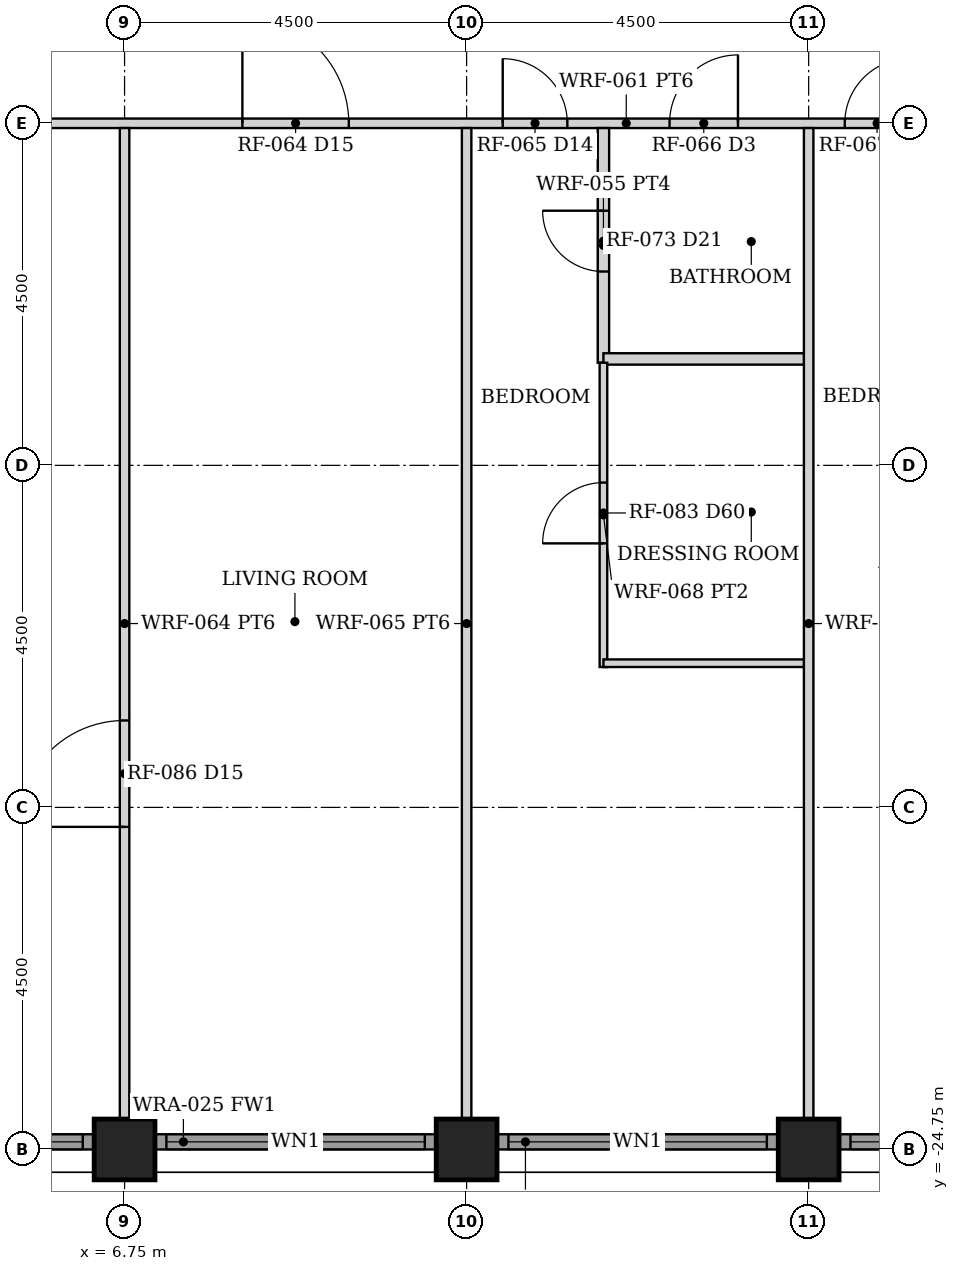
"""IFC4 building model, lengths in metres.
Left out: names, types, materials, properties, quantities, classifications, styles, units other than length and angle.
Written with IfcOpenShell. Run it as: python <this file> out.ifc"""

import sys

from ifc_helpers import new_model, si_unit, direction, frame, frame_2d, origin, origin_2d, place, context, subcontext, project, spatial, rectangle, hollow_rectangle, extrude, element, fill, save


model = new_model("IFC4")
c1 = context("Model", 3, precision=1e-05, world=origin(), true_north=direction((0.0, 1.0)))
c2 = subcontext(c1, "Body", "Model", "MODEL_VIEW")
j1 = project(units=[si_unit("LENGTHUNIT", "METRE"), si_unit("PLANEANGLEUNIT", "RADIAN")], contexts=[c1])
p1 = place(None, origin())
s1 = spatial("IfcSite", under=j1, at=p1, CompositionType="ELEMENT")
p2 = place(p1, origin())
s2 = spatial("IfcBuilding", under=s1, at=p2, CompositionType="ELEMENT")
p3 = place(p2, frame((0.0, 0.0, 79.0)))
s3 = spatial("IfcBuildingStorey", under=s2, at=p3, CompositionType="ELEMENT", Elevation=79.0)
for number, where, z_axis, x_axis in (
    (1, (6.75, -24.75, 0.0), (0.0, 0.0, 1.0), (0.0, 1.0, 0.0)),
    (2, (11.25, -24.75, 0.0), (0.0, 0.0, 1.0), (0.0, 1.0, 0.0)),
    (3, (15.75, -24.75, 0.0), (0.0, 0.0, 1.0), (0.0, 1.0, 0.0)),
):
    element("IfcColumn", number, at=place(p3, frame(where, z_axis=z_axis, x_axis=x_axis)), inside=s3, PredefinedType="COLUMN", context=c2, shape_type="SweptSolid", body=[
        extrude(hollow_rectangle(XDim=0.8, YDim=0.8, WallThickness=0.06, at=origin_2d()), origin(), (0.0, 0.0, 1.0), 3.5),
    ])
p4 = place(p3, frame((2.655, -24.65, 0.0), z_axis=(0.0, 0.0, 1.0), x_axis=(1.0, 0.0, 0.0)))
e4 = element("IfcWall", 4, at=p4, inside=s3, PredefinedType="SOLIDWALL", context=c2, shape_type="SweptSolid", body=[
    extrude(rectangle(XDim=3.69, YDim=0.2, at=frame_2d((1.845, 0.0))), origin(), (0.0, 0.0, 1.0), 2.379),
])
p5 = place(p4, frame((0.145, 0.0, 0.3)))
e5 = element("IfcOpeningElement", 5, at=p5, cuts=e4, PredefinedType="OPENING", context=c2, shape_type="SweptSolid", body=[
    extrude(rectangle(XDim=3.4, YDim=1.929, at=frame_2d((1.7, 0.964))), frame((0.0, 0.11, 0.0), z_axis=(0.0, -1.0, 0.0), x_axis=(1.0, 0.0, 0.0)), (0.0, 0.0, 1.0), 0.22),
])
p6 = place(p3, frame((7.155, -24.65, 0.0), z_axis=(0.0, 0.0, 1.0), x_axis=(1.0, 0.0, 0.0)))
e6 = element("IfcWall", 6, at=p6, inside=s3, PredefinedType="SOLIDWALL", context=c2, shape_type="SweptSolid", body=[
    extrude(rectangle(XDim=3.69, YDim=0.2, at=frame_2d((1.845, 0.0))), origin(), (0.0, 0.0, 1.0), 2.379),
])
p7 = place(p6, frame((0.145, 0.0, 0.3)))
e7 = element("IfcOpeningElement", 7, at=p7, cuts=e6, PredefinedType="OPENING", context=c2, shape_type="SweptSolid", body=[
    extrude(rectangle(XDim=3.4, YDim=1.929, at=frame_2d((1.7, 0.964))), frame((0.0, 0.11, 0.0), z_axis=(0.0, -1.0, 0.0), x_axis=(1.0, 0.0, 0.0)), (0.0, 0.0, 1.0), 0.22),
])
p8 = place(p3, frame((11.655, -24.65, 0.0), z_axis=(0.0, 0.0, 1.0), x_axis=(1.0, 0.0, 0.0)))
e8 = element("IfcWall", 8, at=p8, inside=s3, PredefinedType="SOLIDWALL", context=c2, shape_type="SweptSolid", body=[
    extrude(rectangle(XDim=3.69, YDim=0.2, at=frame_2d((1.845, 0.0))), origin(), (0.0, 0.0, 1.0), 2.379),
])
p9 = place(p8, frame((0.145, 0.0, 0.3)))
e9 = element("IfcOpeningElement", 9, at=p9, cuts=e8, PredefinedType="OPENING", context=c2, shape_type="SweptSolid", body=[
    extrude(rectangle(XDim=3.4, YDim=1.929, at=frame_2d((1.7, 0.964))), frame((0.0, 0.11, 0.0), z_axis=(0.0, -1.0, 0.0), x_axis=(1.0, 0.0, 0.0)), (0.0, 0.0, 1.0), 0.22),
])
p10 = place(p3, frame((16.155, -24.65, 0.0), z_axis=(0.0, 0.0, 1.0), x_axis=(1.0, 0.0, 0.0)))
e10 = element("IfcWall", 10, at=p10, inside=s3, PredefinedType="SOLIDWALL", context=c2, shape_type="SweptSolid", body=[
    extrude(rectangle(XDim=3.69, YDim=0.2, at=frame_2d((1.845, 0.0))), origin(), (0.0, 0.0, 1.0), 2.379),
])
p11 = place(p10, frame((0.145, 0.0, 0.3)))
e11 = element("IfcOpeningElement", 11, at=p11, cuts=e10, PredefinedType="OPENING", context=c2, shape_type="SweptSolid", body=[
    extrude(rectangle(XDim=3.4, YDim=1.929, at=frame_2d((1.7, 0.964))), frame((0.0, 0.11, 0.0), z_axis=(0.0, -1.0, 0.0), x_axis=(1.0, 0.0, 0.0)), (0.0, 0.0, 1.0), 0.22),
])
p12 = place(p3, frame((2.35, -11.25, 0.0), z_axis=(0.0, 0.0, 1.0), x_axis=(1.0, 0.0, 0.0)))
e12 = element("IfcWall", 12, at=p12, inside=s3, PredefinedType="PARTITIONING", context=c2, shape_type="SweptSolid", body=[
    extrude(rectangle(XDim=22.0, YDim=0.125, at=frame_2d((11.0, 0.0))), origin(), (0.0, 0.0, 1.0), 2.373),
])
p13 = place(p12, frame((0.85, 0.0, 0.0)))
e13 = element("IfcOpeningElement", 13, at=p13, cuts=e12, PredefinedType="OPENING", context=c2, shape_type="SweptSolid", body=[
    extrude(rectangle(XDim=0.9, YDim=2.1, at=frame_2d((0.45, 1.05))), frame((0.0, 0.073, 0.0), z_axis=(0.0, -1.0, 0.0), x_axis=(1.0, 0.0, 0.0)), (0.0, 0.0, 1.0), 0.145),
])
p14 = place(p12, frame((5.95, 0.0, 0.0)))
e14 = element("IfcOpeningElement", 14, at=p14, cuts=e12, PredefinedType="OPENING", context=c2, shape_type="SweptSolid", body=[
    extrude(rectangle(XDim=1.4, YDim=2.1, at=frame_2d((0.7, 1.05))), frame((0.0, 0.073, 0.0), z_axis=(0.0, -1.0, 0.0), x_axis=(1.0, 0.0, 0.0)), (0.0, 0.0, 1.0), 0.145),
])
p15 = place(p12, frame((9.375, 0.0, 0.0)))
e15 = element("IfcOpeningElement", 15, at=p15, cuts=e12, PredefinedType="OPENING", context=c2, shape_type="SweptSolid", body=[
    extrude(rectangle(XDim=0.85, YDim=2.1, at=frame_2d((0.425, 1.05))), frame((0.0, 0.073, 0.0), z_axis=(0.0, -1.0, 0.0), x_axis=(1.0, 0.0, 0.0)), (0.0, 0.0, 1.0), 0.145),
])
p16 = place(p12, frame((11.57, 0.0, 0.0)))
e16 = element("IfcOpeningElement", 16, at=p16, cuts=e12, PredefinedType="OPENING", context=c2, shape_type="SweptSolid", body=[
    extrude(rectangle(XDim=0.9, YDim=2.1, at=frame_2d((0.45, 1.05))), frame((0.0, 0.073, 0.0), z_axis=(0.0, -1.0, 0.0), x_axis=(1.0, 0.0, 0.0)), (0.0, 0.0, 1.0), 0.145),
])
p17 = place(p12, frame((13.875, 0.0, 0.0)))
e17 = element("IfcOpeningElement", 17, at=p17, cuts=e12, PredefinedType="OPENING", context=c2, shape_type="SweptSolid", body=[
    extrude(rectangle(XDim=0.85, YDim=2.1, at=frame_2d((0.425, 1.05))), frame((0.0, 0.073, 0.0), z_axis=(0.0, -1.0, 0.0), x_axis=(1.0, 0.0, 0.0)), (0.0, 0.0, 1.0), 0.145),
])
p18 = place(p12, frame((18.375, 0.0, 0.0)))
e18 = element("IfcOpeningElement", 18, at=p18, cuts=e12, PredefinedType="OPENING", context=c2, shape_type="SweptSolid", body=[
    extrude(rectangle(XDim=0.85, YDim=2.1, at=frame_2d((0.425, 1.05))), frame((0.0, 0.073, 0.0), z_axis=(0.0, -1.0, 0.0), x_axis=(1.0, 0.0, 0.0)), (0.0, 0.0, 1.0), 0.145),
])
p19 = place(p3, frame((6.75, -24.35, 0.0), z_axis=(0.0, 0.0, 1.0), x_axis=(0.0, 1.0, 0.0)))
e19 = element("IfcWall", 19, at=p19, inside=s3, PredefinedType="PARTITIONING", context=c2, shape_type="SweptSolid", body=[
    extrude(rectangle(XDim=13.038, YDim=0.125, at=frame_2d((6.519, 0.0))), origin(), (0.0, 0.0, 1.0), 2.373),
])
p20 = place(p19, frame((3.844, 0.0, 0.0)))
e20 = element("IfcOpeningElement", 20, at=p20, cuts=e19, PredefinedType="OPENING", context=c2, shape_type="SweptSolid", body=[
    extrude(rectangle(XDim=1.4, YDim=2.1, at=frame_2d((0.7, 1.05))), frame((0.0, 0.073, 0.0), z_axis=(0.0, -1.0, 0.0), x_axis=(1.0, 0.0, 0.0)), (0.0, 0.0, 1.0), 0.145),
])
p21 = place(p3, frame((11.25, -24.35, 0.0), z_axis=(0.0, 0.0, 1.0), x_axis=(0.0, 1.0, 0.0)))
e21 = element("IfcWall", 21, at=p21, inside=s3, PredefinedType="PARTITIONING", context=c2, shape_type="SweptSolid", body=[
    extrude(rectangle(XDim=13.038, YDim=0.125, at=frame_2d((6.519, 0.0))), origin(), (0.0, 0.0, 1.0), 2.373),
])
p22 = place(p3, frame((13.05, -14.4, 0.0), z_axis=(0.0, 0.0, 1.0), x_axis=(0.0, 1.0, 0.0)))
e22 = element("IfcWall", 22, at=p22, inside=s3, PredefinedType="PARTITIONING", context=c2, shape_type="SweptSolid", body=[
    extrude(rectangle(XDim=3.087, YDim=0.15, at=frame_2d((1.544, 0.0))), origin(), (0.0, 0.0, 1.0), 2.373),
])
p23 = place(p22, frame((1.2, 0.0, 0.0)))
e23 = element("IfcOpeningElement", 23, at=p23, cuts=e22, PredefinedType="OPENING", context=c2, shape_type="SweptSolid", body=[
    extrude(rectangle(XDim=0.8, YDim=2.1, at=frame_2d((0.4, 1.05))), frame((0.0, 0.085, 0.0), z_axis=(0.0, -1.0, 0.0), x_axis=(1.0, 0.0, 0.0)), (0.0, 0.0, 1.0), 0.17),
])
p24 = place(p3, frame((13.05, -14.35, 0.0), z_axis=(0.0, 0.0, 1.0), x_axis=(1.0, 0.0, 0.0)))
e24 = element("IfcWall", 24, at=p24, inside=s3, PredefinedType="PARTITIONING", context=c2, shape_type="SweptSolid", body=[
    extrude(rectangle(XDim=2.64, YDim=0.15, at=frame_2d((1.32, 0.0))), origin(), (0.0, 0.0, 1.0), 2.373),
])
p25 = place(p3, frame((13.05, -18.403, 0.0), z_axis=(0.0, 0.0, 1.0), x_axis=(0.0, 1.0, 0.0)))
e25 = element("IfcWall", 25, at=p25, inside=s3, PredefinedType="PARTITIONING", context=c2, shape_type="SweptSolid", body=[
    extrude(rectangle(XDim=4.003, YDim=0.1, at=frame_2d((2.001, 0.0))), origin(), (0.0, 0.0, 1.0), 2.373),
])
p26 = place(p25, frame((1.627, 0.0, 0.0)))
e26 = element("IfcOpeningElement", 26, at=p26, cuts=e25, PredefinedType="OPENING", context=c2, shape_type="SweptSolid", body=[
    extrude(rectangle(XDim=0.8, YDim=2.1, at=frame_2d((0.4, 1.05))), frame((0.0, 0.06, 0.0), z_axis=(0.0, -1.0, 0.0), x_axis=(1.0, 0.0, 0.0)), (0.0, 0.0, 1.0), 0.12),
])
p27 = place(p3, frame((13.05, -18.353, 0.0), z_axis=(0.0, 0.0, 1.0), x_axis=(1.0, 0.0, 0.0)))
e27 = element("IfcWall", 27, at=p27, inside=s3, PredefinedType="PARTITIONING", context=c2, shape_type="SweptSolid", body=[
    extrude(rectangle(XDim=2.64, YDim=0.1, at=frame_2d((1.32, 0.0))), origin(), (0.0, 0.0, 1.0), 2.373),
])
p28 = place(p3, frame((15.75, -24.35, 0.0), z_axis=(0.0, 0.0, 1.0), x_axis=(0.0, 1.0, 0.0)))
e28 = element("IfcWall", 28, at=p28, inside=s3, PredefinedType="PARTITIONING", context=c2, shape_type="SweptSolid", body=[
    extrude(rectangle(XDim=13.038, YDim=0.125, at=frame_2d((6.519, 0.0))), origin(), (0.0, 0.0, 1.0), 2.373),
])
p29 = place(p5, origin())
e29 = element("IfcWindow", 29, at=p29, inside=s3, PartitioningType="SINGLE_PANEL", PredefinedType="WINDOW", context=c2, shape_type="SweptSolid", body=[
    extrude(rectangle(XDim=3.4, YDim=1.929, at=frame_2d((1.7, 0.964))), frame((0.0, 0.03, 0.0), z_axis=(0.0, -1.0, 0.0), x_axis=(1.0, 0.0, 0.0)), (0.0, 0.0, 1.0), 0.06),
])
fill(e5, e29)
p30 = place(p7, origin())
e30 = element("IfcWindow", 30, at=p30, inside=s3, PartitioningType="SINGLE_PANEL", PredefinedType="WINDOW", context=c2, shape_type="SweptSolid", body=[
    extrude(rectangle(XDim=3.4, YDim=1.929, at=frame_2d((1.7, 0.964))), frame((0.0, 0.03, 0.0), z_axis=(0.0, -1.0, 0.0), x_axis=(1.0, 0.0, 0.0)), (0.0, 0.0, 1.0), 0.06),
])
fill(e7, e30)
p31 = place(p9, origin())
e31 = element("IfcWindow", 31, at=p31, inside=s3, PartitioningType="SINGLE_PANEL", PredefinedType="WINDOW", context=c2, shape_type="SweptSolid", body=[
    extrude(rectangle(XDim=3.4, YDim=1.929, at=frame_2d((1.7, 0.964))), frame((0.0, 0.03, 0.0), z_axis=(0.0, -1.0, 0.0), x_axis=(1.0, 0.0, 0.0)), (0.0, 0.0, 1.0), 0.06),
])
fill(e9, e31)
p32 = place(p11, origin())
e32 = element("IfcWindow", 32, at=p32, inside=s3, PartitioningType="SINGLE_PANEL", PredefinedType="WINDOW", context=c2, shape_type="SweptSolid", body=[
    extrude(rectangle(XDim=3.4, YDim=1.929, at=frame_2d((1.7, 0.964))), frame((0.0, 0.03, 0.0), z_axis=(0.0, -1.0, 0.0), x_axis=(1.0, 0.0, 0.0)), (0.0, 0.0, 1.0), 0.06),
])
fill(e11, e32)
p33 = place(p14, origin())
e33 = element("IfcDoor", 33, at=p33, inside=s3, OperationType="SINGLE_SWING_LEFT", PredefinedType="DOOR", context=c2, shape_type="SweptSolid", body=[
    extrude(rectangle(XDim=1.4, YDim=2.1, at=frame_2d((0.7, 1.05))), frame((0.0, 0.025, 0.0), z_axis=(0.0, -1.0, 0.0), x_axis=(1.0, 0.0, 0.0)), (0.0, 0.0, 1.0), 0.05),
])
fill(e14, e33)
p34 = place(p20, origin())
e34 = element("IfcDoor", 34, at=p34, inside=s3, OperationType="SINGLE_SWING_LEFT", PredefinedType="DOOR", context=c2, shape_type="SweptSolid", body=[
    extrude(rectangle(XDim=1.4, YDim=2.1, at=frame_2d((0.7, 1.05))), frame((0.0, 0.025, 0.0), z_axis=(0.0, -1.0, 0.0), x_axis=(1.0, 0.0, 0.0)), (0.0, 0.0, 1.0), 0.05),
])
fill(e20, e34)
p35 = place(p15, origin())
e35 = element("IfcDoor", 35, at=p35, inside=s3, OperationType="SINGLE_SWING_LEFT", PredefinedType="DOOR", context=c2, shape_type="SweptSolid", body=[
    extrude(rectangle(XDim=0.85, YDim=2.1, at=frame_2d((0.425, 1.05))), frame((0.0, 0.025, 0.0), z_axis=(0.0, -1.0, 0.0), x_axis=(1.0, 0.0, 0.0)), (0.0, 0.0, 1.0), 0.05),
])
fill(e15, e35)
p36 = place(p23, origin())
e36 = element("IfcDoor", 36, at=p36, inside=s3, OperationType="SINGLE_SWING_RIGHT", PredefinedType="DOOR", context=c2, shape_type="SweptSolid", body=[
    extrude(rectangle(XDim=0.8, YDim=2.1, at=frame_2d((0.4, 1.05))), frame((0.0, 0.025, 0.0), z_axis=(0.0, -1.0, 0.0), x_axis=(1.0, 0.0, 0.0)), (0.0, 0.0, 1.0), 0.05),
])
fill(e23, e36)
p37 = place(p16, origin())
e37 = element("IfcDoor", 37, at=p37, inside=s3, OperationType="SINGLE_SWING_RIGHT", PredefinedType="DOOR", context=c2, shape_type="SweptSolid", body=[
    extrude(rectangle(XDim=0.9, YDim=2.1, at=frame_2d((0.45, 1.05))), frame((0.0, 0.025, 0.0), z_axis=(0.0, -1.0, 0.0), x_axis=(1.0, 0.0, 0.0)), (0.0, 0.0, 1.0), 0.05),
])
fill(e16, e37)
p38 = place(p26, origin())
e38 = element("IfcDoor", 38, at=p38, inside=s3, OperationType="SINGLE_SWING_LEFT", PredefinedType="DOOR", context=c2, shape_type="SweptSolid", body=[
    extrude(rectangle(XDim=0.8, YDim=2.1, at=frame_2d((0.4, 1.05))), frame((0.0, 0.025, 0.0), z_axis=(0.0, -1.0, 0.0), x_axis=(1.0, 0.0, 0.0)), (0.0, 0.0, 1.0), 0.05),
])
fill(e26, e38)
p39 = place(p17, origin())
e39 = element("IfcDoor", 39, at=p39, inside=s3, OperationType="SINGLE_SWING_RIGHT", PredefinedType="DOOR", context=c2, shape_type="SweptSolid", body=[
    extrude(rectangle(XDim=0.85, YDim=2.1, at=frame_2d((0.425, 1.05))), frame((0.0, 0.025, 0.0), z_axis=(0.0, -1.0, 0.0), x_axis=(1.0, 0.0, 0.0)), (0.0, 0.0, 1.0), 0.05),
])
fill(e17, e39)
save(model, sys.argv[1])
